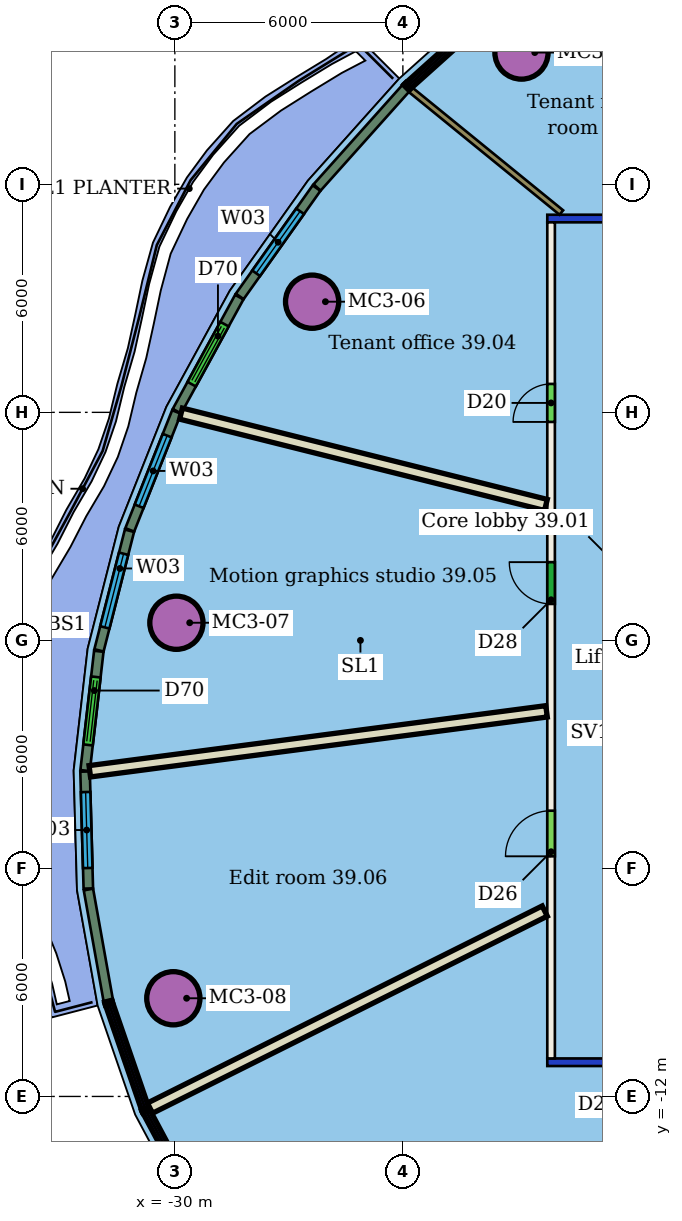
"""IFC4 building model, lengths in metres.
Left out: names, types, materials, properties, quantities, classifications, styles, units other than length and angle.
Written with IfcOpenShell. Run it as: python <this file> out.ifc"""

import sys

from ifc_helpers import new_model, si_unit, direction, frame, frame_2d, origin, origin_2d, place, context, subcontext, project, spatial, rectangle, hollow_circle, extrude, element, fill, save


model = new_model("IFC4")
c1 = context("Model", 3, precision=1e-05, world=origin(), true_north=direction((0.0, 1.0)))
c2 = subcontext(c1, "Body", "Model", "MODEL_VIEW")
j1 = project(units=[si_unit("LENGTHUNIT", "METRE"), si_unit("PLANEANGLEUNIT", "RADIAN")], contexts=[c1])
p1 = place(None, origin())
s1 = spatial("IfcSite", under=j1, at=p1, CompositionType="ELEMENT")
p2 = place(p1, origin())
s2 = spatial("IfcBuilding", under=s1, at=p2, CompositionType="ELEMENT")
p3 = place(p2, frame((0.0, 0.0, 165.0)))
s3 = spatial("IfcBuildingStorey", under=s2, at=p3, CompositionType="ELEMENT", Elevation=165.0)
for number, where, z_axis, x_axis in (
    (1, (-20.879, 15.467, 0.0), (0.0, 0.0, 1.0), (1.0, 0.0, 0.0)),
    (2, (-26.388, 8.912, 0.0), (0.0, 0.0, 1.0), (1.0, 0.0, 0.0)),
    (3, (-29.959, 0.464, 0.0), (0.0, 0.0, 1.0), (1.0, 0.0, 0.0)),
    (4, (-30.041, -9.417, 0.0), (0.0, 0.0, 1.0), (1.0, 0.0, 0.0)),
):
    element("IfcColumn", number, at=place(p3, frame(where, z_axis=z_axis, x_axis=x_axis)), inside=s3, PredefinedType="COLUMN", context=c2, shape_type="SweptSolid", body=[
        extrude(hollow_circle(Radius=0.7, WallThickness=0.05, at=origin_2d()), origin(), (0.0, 0.0, 1.0), 3.45),
    ])
p4 = place(p3, frame((8.2, -11.1, 0.0), z_axis=(0.0, 0.0, 1.0), x_axis=(-1.0, 0.0, 0.0)))
e5 = element("IfcWall", 5, at=p4, inside=s3, PredefinedType="PARTITIONING", context=c2, shape_type="SweptSolid", body=[
    extrude(rectangle(XDim=28.4, YDim=0.2, at=frame_2d((14.2, 0.0))), origin(), (0.0, 0.0, 1.0), 3.05),
])
p5 = place(p4, frame((24.59, 0.0, 0.0)))
e6 = element("IfcOpeningElement", 6, at=p5, cuts=e5, PredefinedType="OPENING", context=c2, shape_type="SweptSolid", body=[
    extrude(rectangle(XDim=1.2, YDim=2.1, at=frame_2d((0.6, 1.05))), frame((0.0, 0.11, 0.0), z_axis=(0.0, -1.0, 0.0), x_axis=(1.0, 0.0, 0.0)), (0.0, 0.0, 1.0), 0.22),
])
p6 = place(p4, frame((19.316, 0.0, 0.0)))
e7 = element("IfcOpeningElement", 7, at=p6, cuts=e5, PredefinedType="OPENING", context=c2, shape_type="SweptSolid", body=[
    extrude(rectangle(XDim=1.2, YDim=2.1, at=frame_2d((0.6, 1.05))), frame((0.0, 0.11, 0.0), z_axis=(0.0, -1.0, 0.0), x_axis=(1.0, 0.0, 0.0)), (0.0, 0.0, 1.0), 0.22),
])
p7 = place(p4, frame((14.986, 0.0, 0.0)))
e8 = element("IfcOpeningElement", 8, at=p7, cuts=e5, PredefinedType="OPENING", context=c2, shape_type="SweptSolid", body=[
    extrude(rectangle(XDim=1.8, YDim=2.4, at=frame_2d((0.9, 1.2))), frame((0.0, 0.11, 0.0), z_axis=(0.0, -1.0, 0.0), x_axis=(1.0, 0.0, 0.0)), (0.0, 0.0, 1.0), 0.22),
])
p8 = place(p4, frame((8.594, 0.0, 0.0)))
e9 = element("IfcOpeningElement", 9, at=p8, cuts=e5, PredefinedType="OPENING", context=c2, shape_type="SweptSolid", body=[
    extrude(rectangle(XDim=1.5, YDim=2.1, at=frame_2d((0.75, 1.05))), frame((0.0, 0.11, 0.0), z_axis=(0.0, -1.0, 0.0), x_axis=(1.0, 0.0, 0.0)), (0.0, 0.0, 1.0), 0.22),
])
p9 = place(p4, frame((4.011, 0.0, 0.0)))
e10 = element("IfcOpeningElement", 10, at=p9, cuts=e5, PredefinedType="OPENING", context=c2, shape_type="SweptSolid", body=[
    extrude(rectangle(XDim=1.2, YDim=2.1, at=frame_2d((0.6, 1.05))), frame((0.0, 0.11, 0.0), z_axis=(0.0, -1.0, 0.0), x_axis=(1.0, 0.0, 0.0)), (0.0, 0.0, 1.0), 0.22),
])
p10 = place(p3, frame((-20.1, -11.0, 0.0), z_axis=(0.0, 0.0, 1.0), x_axis=(0.0, 1.0, 0.0)))
e11 = element("IfcWall", 11, at=p10, inside=s3, PredefinedType="PARTITIONING", context=c2, shape_type="SweptSolid", body=[
    extrude(rectangle(XDim=22.0, YDim=0.2, at=frame_2d((11.0, 0.0))), origin(), (0.0, 0.0, 1.0), 3.45),
])
p11 = place(p10, frame((16.748, 0.0, 0.0)))
e12 = element("IfcOpeningElement", 12, at=p11, cuts=e11, PredefinedType="OPENING", context=c2, shape_type="SweptSolid", body=[
    extrude(rectangle(XDim=1.0, YDim=2.1, at=frame_2d((0.5, 1.05))), frame((0.0, 0.11, 0.0), z_axis=(0.0, -1.0, 0.0), x_axis=(1.0, 0.0, 0.0)), (0.0, 0.0, 1.0), 0.22),
])
p12 = place(p10, frame((11.959, 0.0, 0.0)))
e13 = element("IfcOpeningElement", 13, at=p12, cuts=e11, PredefinedType="OPENING", context=c2, shape_type="SweptSolid", body=[
    extrude(rectangle(XDim=1.1, YDim=2.1, at=frame_2d((0.55, 1.05))), frame((0.0, 0.11, 0.0), z_axis=(0.0, -1.0, 0.0), x_axis=(1.0, 0.0, 0.0)), (0.0, 0.0, 1.0), 0.22),
])
p13 = place(p10, frame((5.319, 0.0, 0.0)))
e14 = element("IfcOpeningElement", 14, at=p13, cuts=e11, PredefinedType="OPENING", context=c2, shape_type="SweptSolid", body=[
    extrude(rectangle(XDim=1.2, YDim=2.1, at=frame_2d((0.6, 1.05))), frame((0.0, 0.11, 0.0), z_axis=(0.0, -1.0, 0.0), x_axis=(1.0, 0.0, 0.0)), (0.0, 0.0, 1.0), 0.22),
])
p14 = place(p3, frame((-20.2, 11.1, 0.0), z_axis=(0.0, 0.0, 1.0), x_axis=(1.0, 0.0, 0.0)))
e15 = element("IfcWall", 15, at=p14, inside=s3, PredefinedType="PARTITIONING", context=c2, shape_type="SweptSolid", body=[
    extrude(rectangle(XDim=28.4, YDim=0.2, at=frame_2d((14.2, 0.0))), origin(), (0.0, 0.0, 1.0), 3.05),
])
p15 = place(p14, frame((23.297, 0.0, 0.0)))
e16 = element("IfcOpeningElement", 16, at=p15, cuts=e15, PredefinedType="OPENING", context=c2, shape_type="SweptSolid", body=[
    extrude(rectangle(XDim=1.0, YDim=2.1, at=frame_2d((0.5, 1.05))), frame((0.0, 0.11, 0.0), z_axis=(0.0, -1.0, 0.0), x_axis=(1.0, 0.0, 0.0)), (0.0, 0.0, 1.0), 0.22),
])
p16 = place(p14, frame((15.555, 0.0, 0.0)))
e17 = element("IfcOpeningElement", 17, at=p16, cuts=e15, PredefinedType="OPENING", context=c2, shape_type="SweptSolid", body=[
    extrude(rectangle(XDim=1.8, YDim=2.1, at=frame_2d((0.9, 1.05))), frame((0.0, 0.11, 0.0), z_axis=(0.0, -1.0, 0.0), x_axis=(1.0, 0.0, 0.0)), (0.0, 0.0, 1.0), 0.22),
])
p17 = place(p14, frame((4.251, 0.0, 0.0)))
e18 = element("IfcOpeningElement", 18, at=p17, cuts=e15, PredefinedType="OPENING", context=c2, shape_type="SweptSolid", body=[
    extrude(rectangle(XDim=0.9, YDim=2.1, at=frame_2d((0.45, 1.05))), frame((0.0, 0.11, 0.0), z_axis=(0.0, -1.0, 0.0), x_axis=(1.0, 0.0, 0.0)), (0.0, 0.0, 1.0), 0.22),
])
p18 = place(p3, frame((-23.794, 14.485, 0.0), z_axis=(0.0, 0.0, 1.0), x_axis=(0.775504350121, -0.631342223317, 0.0)))
e19 = element("IfcWall", 19, at=p18, inside=s3, PredefinedType="PARTITIONING", context=c2, shape_type="SweptSolid", body=[
    extrude(rectangle(XDim=5.111, YDim=0.15, at=frame_2d((2.556, 0.0))), origin(), (0.0, 0.0, 1.0), 3.45),
])
p19 = place(p3, frame((-29.838, 5.967, 0.0), z_axis=(0.0, 0.0, 1.0), x_axis=(0.970074268606, -0.242808388216, 0.0)))
e20 = element("IfcWall", 20, at=p19, inside=s3, PredefinedType="PARTITIONING", context=c2, shape_type="SweptSolid", body=[
    extrude(rectangle(XDim=9.898, YDim=0.3, at=frame_2d((4.949, 0.0))), origin(), (0.0, 0.0, 1.0), 3.45),
])
p20 = place(p3, frame((-32.239, -3.444, 0.0), z_axis=(0.0, 0.0, 1.0), x_axis=(0.991492708273, 0.130162242765, 0.0)))
e21 = element("IfcWall", 21, at=p20, inside=s3, PredefinedType="PARTITIONING", context=c2, shape_type="SweptSolid", body=[
    extrude(rectangle(XDim=12.122, YDim=0.3, at=frame_2d((6.061, 0.0))), origin(), (0.0, 0.0, 1.0), 3.45),
])
p21 = place(p3, frame((-30.655, -12.308, 0.0), z_axis=(0.0, 0.0, 1.0), x_axis=(0.894708785018, 0.446649963632, 0.0)))
e22 = element("IfcWall", 22, at=p21, inside=s3, PredefinedType="PARTITIONING", context=c2, shape_type="SweptSolid", body=[
    extrude(rectangle(XDim=11.61, YDim=0.3, at=frame_2d((5.805, 0.0))), origin(), (0.0, 0.0, 1.0), 3.45),
])
p22 = place(p3, frame((-22.868, -21.025, 0.0), z_axis=(0.0, 0.0, 1.0), x_axis=(0.625768349668, 0.780008956713, 0.0)))
e23 = element("IfcWall", 23, at=p22, inside=s3, PredefinedType="PARTITIONING", context=c2, shape_type="SweptSolid", body=[
    extrude(rectangle(XDim=12.476, YDim=0.3, at=frame_2d((6.238, 0.0))), origin(), (0.0, 0.0, 1.0), 3.45),
])
p23 = place(p3, frame((-23.919, 14.532, 0.0), z_axis=(0.0, 0.0, 1.0), x_axis=(-0.666731798782, -0.745297731443, 0.0)))
e24 = element("IfcWall", 24, at=p23, inside=s3, PredefinedType="SOLIDWALL", context=c2, shape_type="SweptSolid", body=[
    extrude(rectangle(XDim=3.508, YDim=0.25, at=frame_2d((1.754, 0.0))), origin(), (0.0, 0.0, 1.0), 3.1),
])
p24 = place(p3, frame((-26.271, 11.9, 0.0), z_axis=(0.0, 0.0, 1.0), x_axis=(-0.578670547214, -0.815561400378, 0.0)))
e25 = element("IfcWall", 25, at=p24, inside=s3, PredefinedType="SOLIDWALL", context=c2, shape_type="SweptSolid", body=[
    extrude(rectangle(XDim=3.494, YDim=0.25, at=frame_2d((1.747, 0.0))), origin(), (0.0, 0.0, 1.0), 3.1),
])
p25 = place(p24, frame((0.747, 0.0, 0.9)))
e26 = element("IfcOpeningElement", 26, at=p25, cuts=e25, PredefinedType="OPENING", context=c2, shape_type="SweptSolid", body=[
    extrude(rectangle(XDim=2.0, YDim=2.1, at=frame_2d((1.0, 1.05))), frame((0.0, 0.135, 0.0), z_axis=(0.0, -1.0, 0.0), x_axis=(1.0, 0.0, 0.0)), (0.0, 0.0, 1.0), 0.27),
])
p26 = place(p3, frame((-28.305, 9.032, 0.0), z_axis=(0.0, 0.0, 1.0), x_axis=(-0.479577095585, -0.87749974894, 0.0)))
e27 = element("IfcWall", 27, at=p26, inside=s3, PredefinedType="SOLIDWALL", context=c2, shape_type="SweptSolid", body=[
    extrude(rectangle(XDim=3.42, YDim=0.25, at=frame_2d((1.71, 0.0))), origin(), (0.0, 0.0, 1.0), 3.1),
])
p27 = place(p26, frame((0.81, 0.0, 0.0)))
e28 = element("IfcOpeningElement", 28, at=p27, cuts=e27, PredefinedType="OPENING", context=c2, shape_type="SweptSolid", body=[
    extrude(rectangle(XDim=1.8, YDim=2.4, at=frame_2d((0.9, 1.2))), frame((0.0, 0.135, 0.0), z_axis=(0.0, -1.0, 0.0), x_axis=(1.0, 0.0, 0.0)), (0.0, 0.0, 1.0), 0.27),
])
p28 = place(p3, frame((-29.956, 6.009, 0.0), z_axis=(0.0, 0.0, 1.0), x_axis=(-0.369043171551, -0.92941225381, 0.0)))
e29 = element("IfcWall", 29, at=p28, inside=s3, PredefinedType="SOLIDWALL", context=c2, shape_type="SweptSolid", body=[
    extrude(rectangle(XDim=3.337, YDim=0.25, at=frame_2d((1.668, 0.0))), origin(), (0.0, 0.0, 1.0), 3.1),
])
p29 = place(p28, frame((0.668, 0.0, 0.9)))
e30 = element("IfcOpeningElement", 30, at=p29, cuts=e29, PredefinedType="OPENING", context=c2, shape_type="SweptSolid", body=[
    extrude(rectangle(XDim=2.0, YDim=2.1, at=frame_2d((1.0, 1.05))), frame((0.0, 0.135, 0.0), z_axis=(0.0, -1.0, 0.0), x_axis=(1.0, 0.0, 0.0)), (0.0, 0.0, 1.0), 0.27),
])
p30 = place(p3, frame((-31.195, 2.885, 0.0), z_axis=(0.0, 0.0, 1.0), x_axis=(-0.246989866145, -0.969018062794, 0.0)))
e31 = element("IfcWall", 31, at=p30, inside=s3, PredefinedType="SOLIDWALL", context=c2, shape_type="SweptSolid", body=[
    extrude(rectangle(XDim=3.248, YDim=0.25, at=frame_2d((1.624, 0.0))), origin(), (0.0, 0.0, 1.0), 3.1),
])
p31 = place(p30, frame((0.624, 0.0, 0.9)))
e32 = element("IfcOpeningElement", 32, at=p31, cuts=e31, PredefinedType="OPENING", context=c2, shape_type="SweptSolid", body=[
    extrude(rectangle(XDim=2.0, YDim=2.1, at=frame_2d((1.0, 1.05))), frame((0.0, 0.135, 0.0), z_axis=(0.0, -1.0, 0.0), x_axis=(1.0, 0.0, 0.0)), (0.0, 0.0, 1.0), 0.27),
])
p32 = place(p3, frame((-32.001, -0.287, 0.0), z_axis=(0.0, 0.0, 1.0), x_axis=(-0.114119674423, -0.993467009975, 0.0)))
e33 = element("IfcWall", 33, at=p32, inside=s3, PredefinedType="SOLIDWALL", context=c2, shape_type="SweptSolid", body=[
    extrude(rectangle(XDim=3.16, YDim=0.25, at=frame_2d((1.58, 0.0))), origin(), (0.0, 0.0, 1.0), 3.1),
])
p33 = place(p32, frame((0.68, 0.0, 0.0)))
e34 = element("IfcOpeningElement", 34, at=p33, cuts=e33, PredefinedType="OPENING", context=c2, shape_type="SweptSolid", body=[
    extrude(rectangle(XDim=1.8, YDim=2.4, at=frame_2d((0.9, 1.2))), frame((0.0, 0.135, 0.0), z_axis=(0.0, -1.0, 0.0), x_axis=(1.0, 0.0, 0.0)), (0.0, 0.0, 1.0), 0.27),
])
p34 = place(p3, frame((-32.363, -3.452, 0.0), z_axis=(0.0, 0.0, 1.0), x_axis=(0.027916757258, -0.99961025138, 0.0)))
e35 = element("IfcWall", 35, at=p34, inside=s3, PredefinedType="SOLIDWALL", context=c2, shape_type="SweptSolid", body=[
    extrude(rectangle(XDim=3.078, YDim=0.25, at=frame_2d((1.539, 0.0))), origin(), (0.0, 0.0, 1.0), 3.1),
])
p35 = place(p34, frame((0.539, 0.0, 0.9)))
e36 = element("IfcOpeningElement", 36, at=p35, cuts=e35, PredefinedType="OPENING", context=c2, shape_type="SweptSolid", body=[
    extrude(rectangle(XDim=2.0, YDim=2.1, at=frame_2d((1.0, 1.05))), frame((0.0, 0.135, 0.0), z_axis=(0.0, -1.0, 0.0), x_axis=(1.0, 0.0, 0.0)), (0.0, 0.0, 1.0), 0.27),
])
p36 = place(p3, frame((-32.275, -6.555, 0.0), z_axis=(0.0, 0.0, 1.0), x_axis=(0.176055314448, -0.984380275226, 0.0)))
e37 = element("IfcWall", 37, at=p36, inside=s3, PredefinedType="SOLIDWALL", context=c2, shape_type="SweptSolid", body=[
    extrude(rectangle(XDim=2.969, YDim=0.25, at=frame_2d((1.484, 0.0))), origin(), (0.0, 0.0, 1.0), 3.1),
])
p37 = place(p11, origin())
e38 = element("IfcDoor", 38, at=p37, inside=s3, OperationType="SINGLE_SWING_LEFT", PredefinedType="DOOR", context=c2, shape_type="SweptSolid", body=[
    extrude(rectangle(XDim=1.0, YDim=2.1, at=frame_2d((0.5, 1.05))), frame((0.0, 0.025, 0.0), z_axis=(0.0, -1.0, 0.0), x_axis=(1.0, 0.0, 0.0)), (0.0, 0.0, 1.0), 0.05),
])
fill(e12, e38)
p38 = place(p12, origin())
e39 = element("IfcDoor", 39, at=p38, inside=s3, OperationType="SINGLE_SWING_RIGHT", PredefinedType="DOOR", context=c2, shape_type="SweptSolid", body=[
    extrude(rectangle(XDim=1.1, YDim=2.1, at=frame_2d((0.55, 1.05))), frame((0.0, 0.025, 0.0), z_axis=(0.0, -1.0, 0.0), x_axis=(1.0, 0.0, 0.0)), (0.0, 0.0, 1.0), 0.05),
])
fill(e13, e39)
p39 = place(p13, origin())
e40 = element("IfcDoor", 40, at=p39, inside=s3, OperationType="SINGLE_SWING_LEFT", PredefinedType="DOOR", context=c2, shape_type="SweptSolid", body=[
    extrude(rectangle(XDim=1.2, YDim=2.1, at=frame_2d((0.6, 1.05))), frame((0.0, 0.025, 0.0), z_axis=(0.0, -1.0, 0.0), x_axis=(1.0, 0.0, 0.0)), (0.0, 0.0, 1.0), 0.05),
])
fill(e14, e40)
p40 = place(p25, origin())
e41 = element("IfcWindow", 41, at=p40, inside=s3, PartitioningType="SINGLE_PANEL", PredefinedType="WINDOW", context=c2, shape_type="SweptSolid", body=[
    extrude(rectangle(XDim=2.0, YDim=2.1, at=frame_2d((1.0, 1.05))), frame((0.0, 0.03, 0.0), z_axis=(0.0, -1.0, 0.0), x_axis=(1.0, 0.0, 0.0)), (0.0, 0.0, 1.0), 0.06),
])
fill(e26, e41)
p41 = place(p27, origin())
e42 = element("IfcDoor", 42, at=p41, inside=s3, OperationType="DOUBLE_DOOR_SLIDING", PredefinedType="DOOR", context=c2, shape_type="SweptSolid", body=[
    extrude(rectangle(XDim=1.8, YDim=2.4, at=frame_2d((0.9, 1.2))), frame((0.0, 0.025, 0.0), z_axis=(0.0, -1.0, 0.0), x_axis=(1.0, 0.0, 0.0)), (0.0, 0.0, 1.0), 0.05),
])
fill(e28, e42)
p42 = place(p29, origin())
e43 = element("IfcWindow", 43, at=p42, inside=s3, PartitioningType="SINGLE_PANEL", PredefinedType="WINDOW", context=c2, shape_type="SweptSolid", body=[
    extrude(rectangle(XDim=2.0, YDim=2.1, at=frame_2d((1.0, 1.05))), frame((0.0, 0.03, 0.0), z_axis=(0.0, -1.0, 0.0), x_axis=(1.0, 0.0, 0.0)), (0.0, 0.0, 1.0), 0.06),
])
fill(e30, e43)
p43 = place(p31, origin())
e44 = element("IfcWindow", 44, at=p43, inside=s3, PartitioningType="SINGLE_PANEL", PredefinedType="WINDOW", context=c2, shape_type="SweptSolid", body=[
    extrude(rectangle(XDim=2.0, YDim=2.1, at=frame_2d((1.0, 1.05))), frame((0.0, 0.03, 0.0), z_axis=(0.0, -1.0, 0.0), x_axis=(1.0, 0.0, 0.0)), (0.0, 0.0, 1.0), 0.06),
])
fill(e32, e44)
p44 = place(p33, origin())
e45 = element("IfcDoor", 45, at=p44, inside=s3, OperationType="DOUBLE_DOOR_SLIDING", PredefinedType="DOOR", context=c2, shape_type="SweptSolid", body=[
    extrude(rectangle(XDim=1.8, YDim=2.4, at=frame_2d((0.9, 1.2))), frame((0.0, 0.025, 0.0), z_axis=(0.0, -1.0, 0.0), x_axis=(1.0, 0.0, 0.0)), (0.0, 0.0, 1.0), 0.05),
])
fill(e34, e45)
p45 = place(p35, origin())
e46 = element("IfcWindow", 46, at=p45, inside=s3, PartitioningType="SINGLE_PANEL", PredefinedType="WINDOW", context=c2, shape_type="SweptSolid", body=[
    extrude(rectangle(XDim=2.0, YDim=2.1, at=frame_2d((1.0, 1.05))), frame((0.0, 0.03, 0.0), z_axis=(0.0, -1.0, 0.0), x_axis=(1.0, 0.0, 0.0)), (0.0, 0.0, 1.0), 0.06),
])
fill(e36, e46)
save(model, sys.argv[1])
